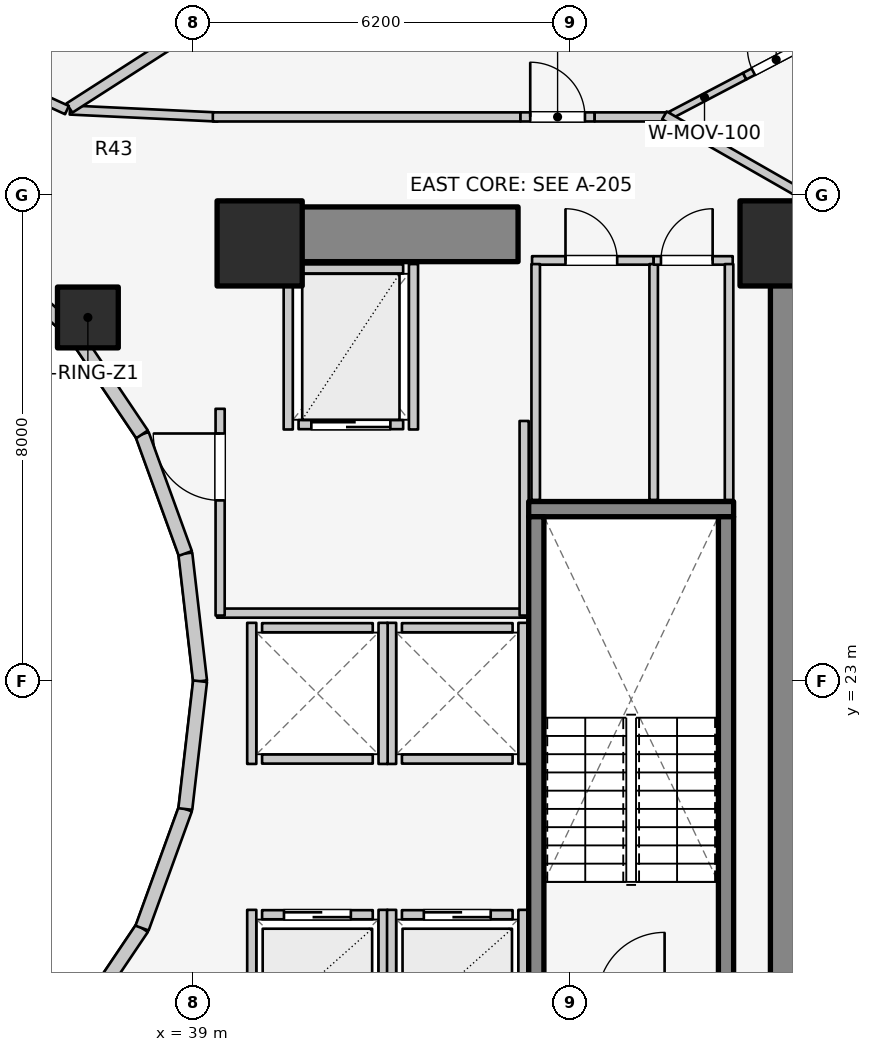
"""IFC4 building model, lengths in metres.
Left out: names, types, materials, properties, quantities, classifications, styles, units other than length and angle.
Written with IfcOpenShell. Run it as: python <this file> out.ifc"""

import sys

from ifc_helpers import new_model, si_unit, direction, frame, frame_2d, origin, origin_2d, place, context, subcontext, project, spatial, rectangle, extrude, element, fill, save


model = new_model("IFC4")
c1 = context("Model", 3, precision=1e-05, world=origin(), true_north=direction((0.0, 1.0)))
c2 = subcontext(c1, "Body", "Model", "MODEL_VIEW")
j1 = project(units=[si_unit("LENGTHUNIT", "METRE"), si_unit("PLANEANGLEUNIT", "RADIAN")], contexts=[c1])
p1 = place(None, origin())
s1 = spatial("IfcSite", under=j1, at=p1, CompositionType="ELEMENT")
p2 = place(p1, origin())
s2 = spatial("IfcBuilding", under=s1, at=p2, CompositionType="ELEMENT")
p3 = place(p2, frame((0.0, 0.0, 52.4)))
s3 = spatial("IfcBuildingStorey", under=s2, at=p3, CompositionType="ELEMENT", Elevation=52.4)
p4 = place(p3, frame((48.95, 17.05, 0.0), z_axis=(0.0, 0.0, 1.0), x_axis=(0.0, 1.0, 0.0)))
e1 = element("IfcWall", 1, at=p4, inside=s3, PredefinedType="SHEAR", context=c2, shape_type="SweptSolid", body=[
    extrude(rectangle(XDim=12.8, YDim=0.9, at=frame_2d((6.4, 0.0))), origin(), (0.0, 0.0, 1.0), 3.1),
])
p5 = place(p3, frame((39.85, 30.35, 0.0), z_axis=(0.0, 0.0, 1.0), x_axis=(1.0, 0.0, 0.0)))
e2 = element("IfcWall", 2, at=p5, inside=s3, PredefinedType="SHEAR", context=c2, shape_type="SweptSolid", body=[
    extrude(rectangle(XDim=4.5, YDim=0.9, at=frame_2d((2.25, 0.0))), origin(), (0.0, 0.0, 1.0), 3.1),
])
p6 = place(p3, frame((44.525, 25.83, 0.0), z_axis=(0.0, 0.0, 1.0), x_axis=(1.0, 0.0, 0.0)))
e3 = element("IfcWall", 3, at=p6, inside=s3, PredefinedType="SOLIDWALL", context=c2, shape_type="SweptSolid", body=[
    extrude(rectangle(XDim=3.37, YDim=0.25, at=frame_2d((1.685, 0.0))), origin(), (0.0, 0.0, 1.0), 3.1),
])
for number, where, z_axis, x_axis in (
    (4, (44.65, 17.895, 0.0), (0.0, 0.0, 1.0), (0.0, 1.0, 0.0)),
    (5, (47.77, 17.895, 0.0), (0.0, 0.0, 1.0), (0.0, 1.0, 0.0)),
):
    element("IfcWall", number, at=place(p3, frame(where, z_axis=z_axis, x_axis=x_axis)), inside=s3, PredefinedType="SOLIDWALL", context=c2, shape_type="SweptSolid", body=[
        extrude(rectangle(XDim=7.81, YDim=0.25, at=frame_2d((3.905, 0.0))), origin(), (0.0, 0.0, 1.0), 3.1),
    ])
for number, where, z_axis, x_axis in (
    (6, (48.7, 30.2, 0.0), (0.0, 0.0, 1.0), (1.0, 0.0, 0.0)),
    (7, (40.1, 30.2, 0.0), (0.0, 0.0, 1.0), (1.0, 0.0, 0.0)),
):
    element("IfcColumn", number, at=place(p3, frame(where, z_axis=z_axis, x_axis=x_axis)), inside=s3, PredefinedType="COLUMN", context=c2, shape_type="SweptSolid", body=[
        extrude(rectangle(XDim=1.4, YDim=1.4, at=origin_2d()), origin(), (0.0, 0.0, 1.0), 3.1),
    ])
p7 = place(p3, frame((37.275, 28.982, 0.0), z_axis=(0.0, 0.0, 1.0), x_axis=(1.0, 0.0, 0.0)))
e8 = element("IfcColumn", 8, at=p7, inside=s3, PredefinedType="COLUMN", context=c2, shape_type="SweptSolid", body=[
    extrude(rectangle(XDim=1.0, YDim=1.0, at=origin_2d()), origin(), (0.0, 0.0, 1.0), 3.1),
])
p8 = place(p3, frame((39.12, 23.0, 0.0), z_axis=(0.0, 0.0, 1.0), x_axis=(-0.114711713601, 0.993398823617, 0.0)))
e9 = element("IfcWall", 9, at=p8, inside=s3, PredefinedType="STANDARD", context=c2, shape_type="SweptSolid", body=[
    extrude(rectangle(XDim=2.115, YDim=0.23, at=frame_2d((1.058, 0.0))), origin(), (0.0, 0.0, 1.0), 2.56),
])
p9 = place(p3, frame((38.877, 25.102, 0.0), z_axis=(0.0, 0.0, 1.0), x_axis=(-0.341423187295, 0.93990968033, 0.0)))
e10 = element("IfcWall", 10, at=p9, inside=s3, PredefinedType="STANDARD", context=c2, shape_type="SweptSolid", body=[
    extrude(rectangle(XDim=2.084, YDim=0.23, at=frame_2d((1.042, 0.0))), origin(), (0.0, 0.0, 1.0), 2.56),
])
p10 = place(p3, frame((38.166, 27.06, 0.0), z_axis=(0.0, 0.0, 1.0), x_axis=(-0.558197800898, 0.829707909492, 0.0)))
e11 = element("IfcWall", 11, at=p10, inside=s3, PredefinedType="STANDARD", context=c2, shape_type="SweptSolid", body=[
    extrude(rectangle(XDim=2.027, YDim=0.23, at=frame_2d((1.013, 0.0))), origin(), (0.0, 0.0, 1.0), 1.22),
])
p11 = place(p3, frame((37.035, 28.742, 0.0), z_axis=(0.0, 0.0, 1.0), x_axis=(-0.752576694707, 0.658504607869, 0.0)))
e12 = element("IfcWall", 12, at=p11, inside=s3, PredefinedType="STANDARD", context=c2, shape_type="SweptSolid", body=[
    extrude(rectangle(XDim=1.959, YDim=0.23, at=frame_2d((0.98, 0.0))), origin(), (0.0, 0.0, 1.0), 1.22),
])
p12 = place(p3, frame((37.035, 17.258, 0.0), z_axis=(0.0, 0.0, 1.0), x_axis=(0.558197800898, 0.829707909492, 0.0)))
e13 = element("IfcWall", 13, at=p12, inside=s3, PredefinedType="STANDARD", context=c2, shape_type="SweptSolid", body=[
    extrude(rectangle(XDim=2.027, YDim=0.23, at=frame_2d((1.013, 0.0))), origin(), (0.0, 0.0, 1.0), 1.22),
])
p13 = place(p3, frame((38.166, 18.94, 0.0), z_axis=(0.0, 0.0, 1.0), x_axis=(0.341423187295, 0.93990968033, 0.0)))
e14 = element("IfcWall", 14, at=p13, inside=s3, PredefinedType="STANDARD", context=c2, shape_type="SweptSolid", body=[
    extrude(rectangle(XDim=2.084, YDim=0.23, at=frame_2d((1.042, 0.0))), origin(), (0.0, 0.0, 1.0), 2.56),
])
p14 = place(p3, frame((38.877, 20.898, 0.0), z_axis=(0.0, 0.0, 1.0), x_axis=(0.114711713601, 0.993398823617, 0.0)))
e15 = element("IfcWall", 15, at=p14, inside=s3, PredefinedType="STANDARD", context=c2, shape_type="SweptSolid", body=[
    extrude(rectangle(XDim=2.115, YDim=0.23, at=frame_2d((1.058, 0.0))), origin(), (0.0, 0.0, 1.0), 2.56),
])
p15 = place(p3, frame((40.14, 19.16, 0.0), z_axis=(0.0, 0.0, 1.0), x_axis=(1.0, 0.0, 0.0)))
e16 = element("IfcWall", 16, at=p15, inside=s3, PredefinedType="SOLIDWALL", context=c2, shape_type="SweptSolid", body=[
    extrude(rectangle(XDim=1.82, YDim=0.15, at=frame_2d((0.91, 0.0))), origin(), (0.0, 0.0, 1.0), 2.12),
])
p16 = place(p15, frame((0.36, 0.0, 0.0)))
e17 = element("IfcOpeningElement", 17, at=p16, cuts=e16, PredefinedType="OPENING", context=c2, shape_type="SweptSolid", body=[
    extrude(rectangle(XDim=1.1, YDim=2.1, at=frame_2d((0.55, 1.05))), frame((0.0, 0.085, 0.0), z_axis=(0.0, -1.0, 0.0), x_axis=(1.0, 0.0, 0.0)), (0.0, 0.0, 1.0), 0.17),
])
p17 = place(p3, frame((39.97, 17.02, 0.0), z_axis=(0.0, 0.0, 1.0), x_axis=(0.0, 1.0, 0.0)))
e18 = element("IfcWall", 18, at=p17, inside=s3, PredefinedType="SOLIDWALL", context=c2, shape_type="SweptSolid", body=[
    extrude(rectangle(XDim=2.22, YDim=0.15, at=frame_2d((1.11, 0.0))), origin(), (0.0, 0.0, 1.0), 1.873),
])
p18 = place(p3, frame((42.13, 17.02, 0.0), z_axis=(0.0, 0.0, 1.0), x_axis=(0.0, 1.0, 0.0)))
e19 = element("IfcWall", 19, at=p18, inside=s3, PredefinedType="SOLIDWALL", context=c2, shape_type="SweptSolid", body=[
    extrude(rectangle(XDim=2.22, YDim=0.15, at=frame_2d((1.11, 0.0))), origin(), (0.0, 0.0, 1.0), 2.575),
])
p19 = place(p3, frame((42.44, 19.16, 0.0), z_axis=(0.0, 0.0, 1.0), x_axis=(1.0, 0.0, 0.0)))
e20 = element("IfcWall", 20, at=p19, inside=s3, PredefinedType="SOLIDWALL", context=c2, shape_type="SweptSolid", body=[
    extrude(rectangle(XDim=1.82, YDim=0.15, at=frame_2d((0.91, 0.0))), origin(), (0.0, 0.0, 1.0), 2.575),
])
p20 = place(p19, frame((0.36, 0.0, 0.0)))
e21 = element("IfcOpeningElement", 21, at=p20, cuts=e20, PredefinedType="OPENING", context=c2, shape_type="SweptSolid", body=[
    extrude(rectangle(XDim=1.1, YDim=2.1, at=frame_2d((0.55, 1.05))), frame((0.0, 0.085, 0.0), z_axis=(0.0, -1.0, 0.0), x_axis=(1.0, 0.0, 0.0)), (0.0, 0.0, 1.0), 0.17),
])
p21 = place(p3, frame((42.27, 17.02, 0.0), z_axis=(0.0, 0.0, 1.0), x_axis=(0.0, 1.0, 0.0)))
e22 = element("IfcWall", 22, at=p21, inside=s3, PredefinedType="SOLIDWALL", context=c2, shape_type="SweptSolid", body=[
    extrude(rectangle(XDim=2.22, YDim=0.15, at=frame_2d((1.11, 0.0))), origin(), (0.0, 0.0, 1.0), 2.575),
])
p22 = place(p3, frame((44.43, 17.02, 0.0), z_axis=(0.0, 0.0, 1.0), x_axis=(0.0, 1.0, 0.0)))
e23 = element("IfcWall", 23, at=p22, inside=s3, PredefinedType="SOLIDWALL", context=c2, shape_type="SweptSolid", body=[
    extrude(rectangle(XDim=2.22, YDim=0.15, at=frame_2d((1.11, 0.0))), origin(), (0.0, 0.0, 1.0), 2.12),
])
for number, where, z_axis, x_axis in (
    (24, (42.44, 21.72, 0.0), (0.0, 0.0, 1.0), (1.0, 0.0, 0.0)),
    (25, (42.44, 23.88, 0.0), (0.0, 0.0, 1.0), (1.0, 0.0, 0.0)),
):
    element("IfcWall", number, at=place(p3, frame(where, z_axis=z_axis, x_axis=x_axis)), inside=s3, PredefinedType="SOLIDWALL", context=c2, shape_type="SweptSolid", body=[
        extrude(rectangle(XDim=1.82, YDim=0.15, at=frame_2d((0.91, 0.0))), origin(), (0.0, 0.0, 1.0), 2.575),
    ])
for number, where, z_axis, x_axis in (
    (26, (42.27, 21.64, 0.0), (0.0, 0.0, 1.0), (0.0, 1.0, 0.0)),
    (27, (44.43, 21.64, 0.0), (0.0, 0.0, 1.0), (0.0, 1.0, 0.0)),
):
    element("IfcWall", number, at=place(p3, frame(where, z_axis=z_axis, x_axis=x_axis)), inside=s3, PredefinedType="SOLIDWALL", context=c2, shape_type="SweptSolid", body=[
        extrude(rectangle(XDim=2.32, YDim=0.15, at=frame_2d((1.16, 0.0))), origin(), (0.0, 0.0, 1.0), 2.575),
    ])
for number, where, z_axis, x_axis in (
    (28, (40.14, 21.72, 0.0), (0.0, 0.0, 1.0), (1.0, 0.0, 0.0)),
    (29, (40.14, 23.88, 0.0), (0.0, 0.0, 1.0), (1.0, 0.0, 0.0)),
):
    element("IfcWall", number, at=place(p3, frame(where, z_axis=z_axis, x_axis=x_axis)), inside=s3, PredefinedType="SOLIDWALL", context=c2, shape_type="SweptSolid", body=[
        extrude(rectangle(XDim=1.82, YDim=0.15, at=frame_2d((0.91, 0.0))), origin(), (0.0, 0.0, 1.0), 2.12),
    ])
p23 = place(p3, frame((39.97, 21.64, 0.0), z_axis=(0.0, 0.0, 1.0), x_axis=(0.0, 1.0, 0.0)))
e30 = element("IfcWall", 30, at=p23, inside=s3, PredefinedType="SOLIDWALL", context=c2, shape_type="SweptSolid", body=[
    extrude(rectangle(XDim=2.32, YDim=0.15, at=frame_2d((1.16, 0.0))), origin(), (0.0, 0.0, 1.0), 2.12),
])
p24 = place(p3, frame((42.13, 21.64, 0.0), z_axis=(0.0, 0.0, 1.0), x_axis=(0.0, 1.0, 0.0)))
e31 = element("IfcWall", 31, at=p24, inside=s3, PredefinedType="SOLIDWALL", context=c2, shape_type="SweptSolid", body=[
    extrude(rectangle(XDim=2.32, YDim=0.15, at=frame_2d((1.16, 0.0))), origin(), (0.0, 0.0, 1.0), 2.575),
])
p25 = place(p3, frame((40.74, 27.22, 0.0), z_axis=(0.0, 0.0, 1.0), x_axis=(1.0, 0.0, 0.0)))
e32 = element("IfcWall", 32, at=p25, inside=s3, PredefinedType="SOLIDWALL", context=c2, shape_type="SweptSolid", body=[
    extrude(rectangle(XDim=1.72, YDim=0.15, at=frame_2d((0.86, 0.0))), origin(), (0.0, 0.0, 1.0), 2.575),
])
p26 = place(p25, frame((0.21, 0.0, 0.0)))
e33 = element("IfcOpeningElement", 33, at=p26, cuts=e32, PredefinedType="OPENING", context=c2, shape_type="SweptSolid", body=[
    extrude(rectangle(XDim=1.3, YDim=2.1, at=frame_2d((0.65, 1.05))), frame((0.0, 0.085, 0.0), z_axis=(0.0, -1.0, 0.0), x_axis=(1.0, 0.0, 0.0)), (0.0, 0.0, 1.0), 0.17),
])
p27 = place(p3, frame((40.74, 29.78, 0.0), z_axis=(0.0, 0.0, 1.0), x_axis=(1.0, 0.0, 0.0)))
e34 = element("IfcWall", 34, at=p27, inside=s3, PredefinedType="SOLIDWALL", context=c2, shape_type="SweptSolid", body=[
    extrude(rectangle(XDim=1.72, YDim=0.15, at=frame_2d((0.86, 0.0))), origin(), (0.0, 0.0, 1.0), 2.575),
])
for number, where, z_axis, x_axis in (
    (35, (40.57, 27.14, 0.0), (0.0, 0.0, 1.0), (0.0, 1.0, 0.0)),
    (36, (42.63, 27.14, 0.0), (0.0, 0.0, 1.0), (0.0, 1.0, 0.0)),
):
    element("IfcWall", number, at=place(p3, frame(where, z_axis=z_axis, x_axis=x_axis)), inside=s3, PredefinedType="SOLIDWALL", context=c2, shape_type="SweptSolid", body=[
        extrude(rectangle(XDim=2.72, YDim=0.15, at=frame_2d((1.36, 0.0))), origin(), (0.0, 0.0, 1.0), 2.575),
    ])
p28 = place(p3, frame((39.4, 24.12, 0.0), z_axis=(0.0, 0.0, 1.0), x_axis=(1.0, 0.0, 0.0)))
e37 = element("IfcWall", 37, at=p28, inside=s3, PredefinedType="PARTITIONING", context=c2, shape_type="SweptSolid", body=[
    extrude(rectangle(XDim=5.08, YDim=0.15, at=frame_2d((2.54, 0.0))), origin(), (0.0, 0.0, 1.0), 2.12),
])
p29 = place(p3, frame((44.45, 24.08, 0.0), z_axis=(0.0, 0.0, 1.0), x_axis=(0.0, 1.0, 0.0)))
e38 = element("IfcWall", 38, at=p29, inside=s3, PredefinedType="PARTITIONING", context=c2, shape_type="SweptSolid", body=[
    extrude(rectangle(XDim=3.2, YDim=0.15, at=frame_2d((1.6, 0.0))), origin(), (0.0, 0.0, 1.0), 2.575),
])
p30 = place(p3, frame((39.45, 24.08, 0.0), z_axis=(0.0, 0.0, 1.0), x_axis=(0.0, 1.0, 0.0)))
e39 = element("IfcWall", 39, at=p30, inside=s3, PredefinedType="PARTITIONING", context=c2, shape_type="SweptSolid", body=[
    extrude(rectangle(XDim=3.4, YDim=0.15, at=frame_2d((1.7, 0.0))), origin(), (0.0, 0.0, 1.0), 2.575),
])
p31 = place(p30, frame((1.894, 0.0, 0.0)))
e40 = element("IfcOpeningElement", 40, at=p31, cuts=e39, PredefinedType="OPENING", context=c2, shape_type="SweptSolid", body=[
    extrude(rectangle(XDim=1.1, YDim=2.1, at=frame_2d((0.55, 1.05))), frame((0.0, 0.085, 0.0), z_axis=(0.0, -1.0, 0.0), x_axis=(1.0, 0.0, 0.0)), (0.0, 0.0, 1.0), 0.17),
])
p32 = place(p3, frame((44.58, 29.92, 0.0), z_axis=(0.0, 0.0, 1.0), x_axis=(1.0, 0.0, 0.0)))
e41 = element("IfcWall", 41, at=p32, inside=s3, PredefinedType="PLUMBINGWALL", context=c2, shape_type="SweptSolid", body=[
    extrude(rectangle(XDim=2.0, YDim=0.14, at=frame_2d((1.0, 0.0))), origin(), (0.0, 0.0, 1.0), 2.575),
])
p33 = place(p32, frame((0.55, 0.0, 0.0)))
e42 = element("IfcOpeningElement", 42, at=p33, cuts=e41, PredefinedType="OPENING", context=c2, shape_type="SweptSolid", body=[
    extrude(rectangle(XDim=0.85, YDim=2.05, at=frame_2d((0.425, 1.025))), frame((0.0, 0.08, 0.0), z_axis=(0.0, -1.0, 0.0), x_axis=(1.0, 0.0, 0.0)), (0.0, 0.0, 1.0), 0.16),
])
for number, where, z_axis, x_axis in (
    (43, (44.64, 25.98, 0.0), (0.0, 0.0, 1.0), (0.0, 1.0, 0.0)),
    (44, (46.58, 25.98, 0.0), (0.0, 0.0, 1.0), (0.0, 1.0, 0.0)),
):
    element("IfcWall", number, at=place(p3, frame(where, z_axis=z_axis, x_axis=x_axis)), inside=s3, PredefinedType="PLUMBINGWALL", context=c2, shape_type="SweptSolid", body=[
        extrude(rectangle(XDim=3.88, YDim=0.14, at=frame_2d((1.94, 0.0))), origin(), (0.0, 0.0, 1.0), 2.575),
    ])
p34 = place(p3, frame((46.58, 29.92, 0.0), z_axis=(0.0, 0.0, 1.0), x_axis=(1.0, 0.0, 0.0)))
e45 = element("IfcWall", 45, at=p34, inside=s3, PredefinedType="PLUMBINGWALL", context=c2, shape_type="SweptSolid", body=[
    extrude(rectangle(XDim=1.3, YDim=0.14, at=frame_2d((0.65, 0.0))), origin(), (0.0, 0.0, 1.0), 2.575),
])
p35 = place(p34, frame((0.12, 0.0, 0.0)))
e46 = element("IfcOpeningElement", 46, at=p35, cuts=e45, PredefinedType="OPENING", context=c2, shape_type="SweptSolid", body=[
    extrude(rectangle(XDim=0.85, YDim=2.05, at=frame_2d((0.425, 1.025))), frame((0.0, 0.08, 0.0), z_axis=(0.0, -1.0, 0.0), x_axis=(1.0, 0.0, 0.0)), (0.0, 0.0, 1.0), 0.16),
])
p36 = place(p3, frame((47.82, 25.98, 0.0), z_axis=(0.0, 0.0, 1.0), x_axis=(0.0, 1.0, 0.0)))
e47 = element("IfcWall", 47, at=p36, inside=s3, PredefinedType="PLUMBINGWALL", context=c2, shape_type="SweptSolid", body=[
    extrude(rectangle(XDim=3.88, YDim=0.14, at=frame_2d((1.94, 0.0))), origin(), (0.0, 0.0, 1.0), 2.575),
])
p37 = place(p3, frame((46.756, 32.257, 0.0), z_axis=(0.0, 0.0, 1.0), x_axis=(0.885552742751, 0.464538846391, 0.0)))
e48 = element("IfcWall", 48, at=p37, inside=s3, PredefinedType="MOVABLE", context=c2, shape_type="SweptSolid", body=[
    extrude(rectangle(XDim=1.492, YDim=0.12, at=frame_2d((0.746, 0.0))), origin(), (0.0, 0.0, 1.0), 2.575),
])
p38 = place(p3, frame((48.077, 32.95, 0.0), z_axis=(0.0, 0.0, 1.0), x_axis=(0.885533150024, 0.464576194191, 0.0)))
e49 = element("IfcWall", 49, at=p38, inside=s3, PredefinedType="MOVABLE", context=c2, shape_type="SweptSolid", body=[
    extrude(rectangle(XDim=1.17, YDim=0.12, at=frame_2d((0.585, 0.0))), origin(), (0.0, 0.0, 1.0), 2.11),
])
p39 = place(p38, frame((0.16, 0.0, 0.0)))
e50 = element("IfcOpeningElement", 50, at=p39, cuts=e49, PredefinedType="OPENING", context=c2, shape_type="SweptSolid", body=[
    extrude(rectangle(XDim=0.85, YDim=2.05, at=frame_2d((0.425, 1.025))), frame((0.0, 0.07, 0.0), z_axis=(0.0, -1.0, 0.0), x_axis=(1.0, 0.0, 0.0)), (0.0, 0.0, 1.0), 0.14),
])
p40 = place(p3, frame((36.98, 32.394, 0.0), z_axis=(0.0, 0.0, 1.0), x_axis=(0.998877427952, -0.047369651964, 0.0)))
e51 = element("IfcWall", 51, at=p40, inside=s3, PredefinedType="PARTITIONING", context=c2, shape_type="SweptSolid", body=[
    extrude(rectangle(XDim=2.433, YDim=0.15, at=frame_2d((1.216, 0.0))), origin(), (0.0, 0.0, 1.0), 1.957),
])
p41 = place(p3, frame((39.33, 32.28, 0.0), z_axis=(0.0, 0.0, 1.0), x_axis=(1.0, 0.0, 0.0)))
e52 = element("IfcWall", 52, at=p41, inside=s3, PredefinedType="PARTITIONING", context=c2, shape_type="SweptSolid", body=[
    extrude(rectangle(XDim=5.06, YDim=0.15, at=frame_2d((2.53, 0.0))), origin(), (0.0, 0.0, 1.0), 1.957),
])
p42 = place(p3, frame((44.39, 32.28, 0.0), z_axis=(0.0, 0.0, 1.0), x_axis=(1.0, 0.0, 0.0)))
e53 = element("IfcWall", 53, at=p42, inside=s3, PredefinedType="PARTITIONING", context=c2, shape_type="SweptSolid", body=[
    extrude(rectangle(XDim=1.22, YDim=0.15, at=frame_2d((0.61, 0.0))), origin(), (0.0, 0.0, 1.0), 2.575),
])
p43 = place(p42, frame((0.16, 0.0, 0.0)))
e54 = element("IfcOpeningElement", 54, at=p43, cuts=e53, PredefinedType="OPENING", context=c2, shape_type="SweptSolid", body=[
    extrude(rectangle(XDim=0.9, YDim=2.1, at=frame_2d((0.45, 1.05))), frame((0.0, 0.085, 0.0), z_axis=(0.0, -1.0, 0.0), x_axis=(1.0, 0.0, 0.0)), (0.0, 0.0, 1.0), 0.17),
])
p44 = place(p3, frame((45.61, 32.28, 0.0), z_axis=(0.0, 0.0, 1.0), x_axis=(1.0, 0.0, 0.0)))
e55 = element("IfcWall", 55, at=p44, inside=s3, PredefinedType="PARTITIONING", context=c2, shape_type="SweptSolid", body=[
    extrude(rectangle(XDim=1.24, YDim=0.15, at=frame_2d((0.62, 0.0))), origin(), (0.0, 0.0, 1.0), 2.575),
])
p45 = place(p3, frame((46.757, 32.305, 0.0), z_axis=(0.0, 0.0, 1.0), x_axis=(0.867991349648, -0.496579315857, 0.0)))
e56 = element("IfcWall", 56, at=p45, inside=s3, PredefinedType="PARTITIONING", context=c2, shape_type="SweptSolid", body=[
    extrude(rectangle(XDim=2.567, YDim=0.15, at=frame_2d((1.283, 0.0))), origin(), (0.0, 0.0, 1.0), 1.22),
])
p46 = place(p3, frame((36.971, 32.426, 0.0), z_axis=(0.0, 0.0, 1.0), x_axis=(0.841689919529, 0.5399611832, 0.0)))
e57 = element("IfcWall", 57, at=p46, inside=s3, PredefinedType="PARTITIONING", context=c2, shape_type="SweptSolid", body=[
    extrude(rectangle(XDim=10.058, YDim=0.18, at=frame_2d((5.029, 0.0))), origin(), (0.0, 0.0, 1.0), 1.957),
])
p47 = place(p3, frame((36.931, 32.393, 0.0), z_axis=(0.0, 0.0, 1.0), x_axis=(-0.909645934478, 0.415384489224, 0.0)))
e58 = element("IfcWall", 58, at=p47, inside=s3, PredefinedType="PARTITIONING", context=c2, shape_type="SweptSolid", body=[
    extrude(rectangle(XDim=0.477, YDim=0.15, at=frame_2d((0.238, 0.0))), origin(), (0.0, 0.0, 1.0), 2.575),
])
p48 = place(p16, origin())
e59 = element("IfcDoor", 59, at=p48, inside=s3, OperationType="DOUBLE_DOOR_SLIDING", PredefinedType="DOOR", context=c2, shape_type="SweptSolid", body=[
    extrude(rectangle(XDim=1.1, YDim=2.1, at=frame_2d((0.55, 1.05))), frame((0.0, 0.025, 0.0), z_axis=(0.0, -1.0, 0.0), x_axis=(1.0, 0.0, 0.0)), (0.0, 0.0, 1.0), 0.05),
])
fill(e17, e59)
p49 = place(p20, origin())
e60 = element("IfcDoor", 60, at=p49, inside=s3, OperationType="DOUBLE_DOOR_SLIDING", PredefinedType="DOOR", context=c2, shape_type="SweptSolid", body=[
    extrude(rectangle(XDim=1.1, YDim=2.1, at=frame_2d((0.55, 1.05))), frame((0.0, 0.025, 0.0), z_axis=(0.0, -1.0, 0.0), x_axis=(1.0, 0.0, 0.0)), (0.0, 0.0, 1.0), 0.05),
])
fill(e21, e60)
p50 = place(p26, origin())
e61 = element("IfcDoor", 61, at=p50, inside=s3, OperationType="DOUBLE_DOOR_SLIDING", PredefinedType="DOOR", context=c2, shape_type="SweptSolid", body=[
    extrude(rectangle(XDim=1.3, YDim=2.1, at=frame_2d((0.65, 1.05))), frame((0.0, 0.025, 0.0), z_axis=(0.0, -1.0, 0.0), x_axis=(1.0, 0.0, 0.0)), (0.0, 0.0, 1.0), 0.05),
])
fill(e33, e61)
p51 = place(p31, origin())
e62 = element("IfcDoor", 62, at=p51, inside=s3, OperationType="SINGLE_SWING_RIGHT", PredefinedType="DOOR", context=c2, shape_type="SweptSolid", body=[
    extrude(rectangle(XDim=1.1, YDim=2.1, at=frame_2d((0.55, 1.05))), frame((0.0, 0.025, 0.0), z_axis=(0.0, -1.0, 0.0), x_axis=(1.0, 0.0, 0.0)), (0.0, 0.0, 1.0), 0.05),
])
fill(e40, e62)
p52 = place(p33, origin())
e63 = element("IfcDoor", 63, at=p52, inside=s3, OperationType="SINGLE_SWING_LEFT", PredefinedType="DOOR", context=c2, shape_type="SweptSolid", body=[
    extrude(rectangle(XDim=0.85, YDim=2.05, at=frame_2d((0.425, 1.025))), frame((0.0, 0.025, 0.0), z_axis=(0.0, -1.0, 0.0), x_axis=(1.0, 0.0, 0.0)), (0.0, 0.0, 1.0), 0.05),
])
fill(e42, e63)
p53 = place(p35, origin())
e64 = element("IfcDoor", 64, at=p53, inside=s3, OperationType="SINGLE_SWING_RIGHT", PredefinedType="DOOR", context=c2, shape_type="SweptSolid", body=[
    extrude(rectangle(XDim=0.85, YDim=2.05, at=frame_2d((0.425, 1.025))), frame((0.0, 0.025, 0.0), z_axis=(0.0, -1.0, 0.0), x_axis=(1.0, 0.0, 0.0)), (0.0, 0.0, 1.0), 0.05),
])
fill(e46, e64)
p54 = place(p39, origin())
e65 = element("IfcDoor", 65, at=p54, inside=s3, OperationType="SINGLE_SWING_RIGHT", PredefinedType="DOOR", context=c2, shape_type="SweptSolid", body=[
    extrude(rectangle(XDim=0.85, YDim=2.05, at=frame_2d((0.425, 1.025))), frame((0.0, 0.025, 0.0), z_axis=(0.0, -1.0, 0.0), x_axis=(1.0, 0.0, 0.0)), (0.0, 0.0, 1.0), 0.05),
])
fill(e50, e65)
p55 = place(p43, origin())
e66 = element("IfcDoor", 66, at=p55, inside=s3, OperationType="SINGLE_SWING_LEFT", PredefinedType="DOOR", context=c2, shape_type="SweptSolid", body=[
    extrude(rectangle(XDim=0.9, YDim=2.1, at=frame_2d((0.45, 1.05))), frame((0.0, 0.025, 0.0), z_axis=(0.0, -1.0, 0.0), x_axis=(1.0, 0.0, 0.0)), (0.0, 0.0, 1.0), 0.05),
])
fill(e54, e66)
save(model, sys.argv[1])
